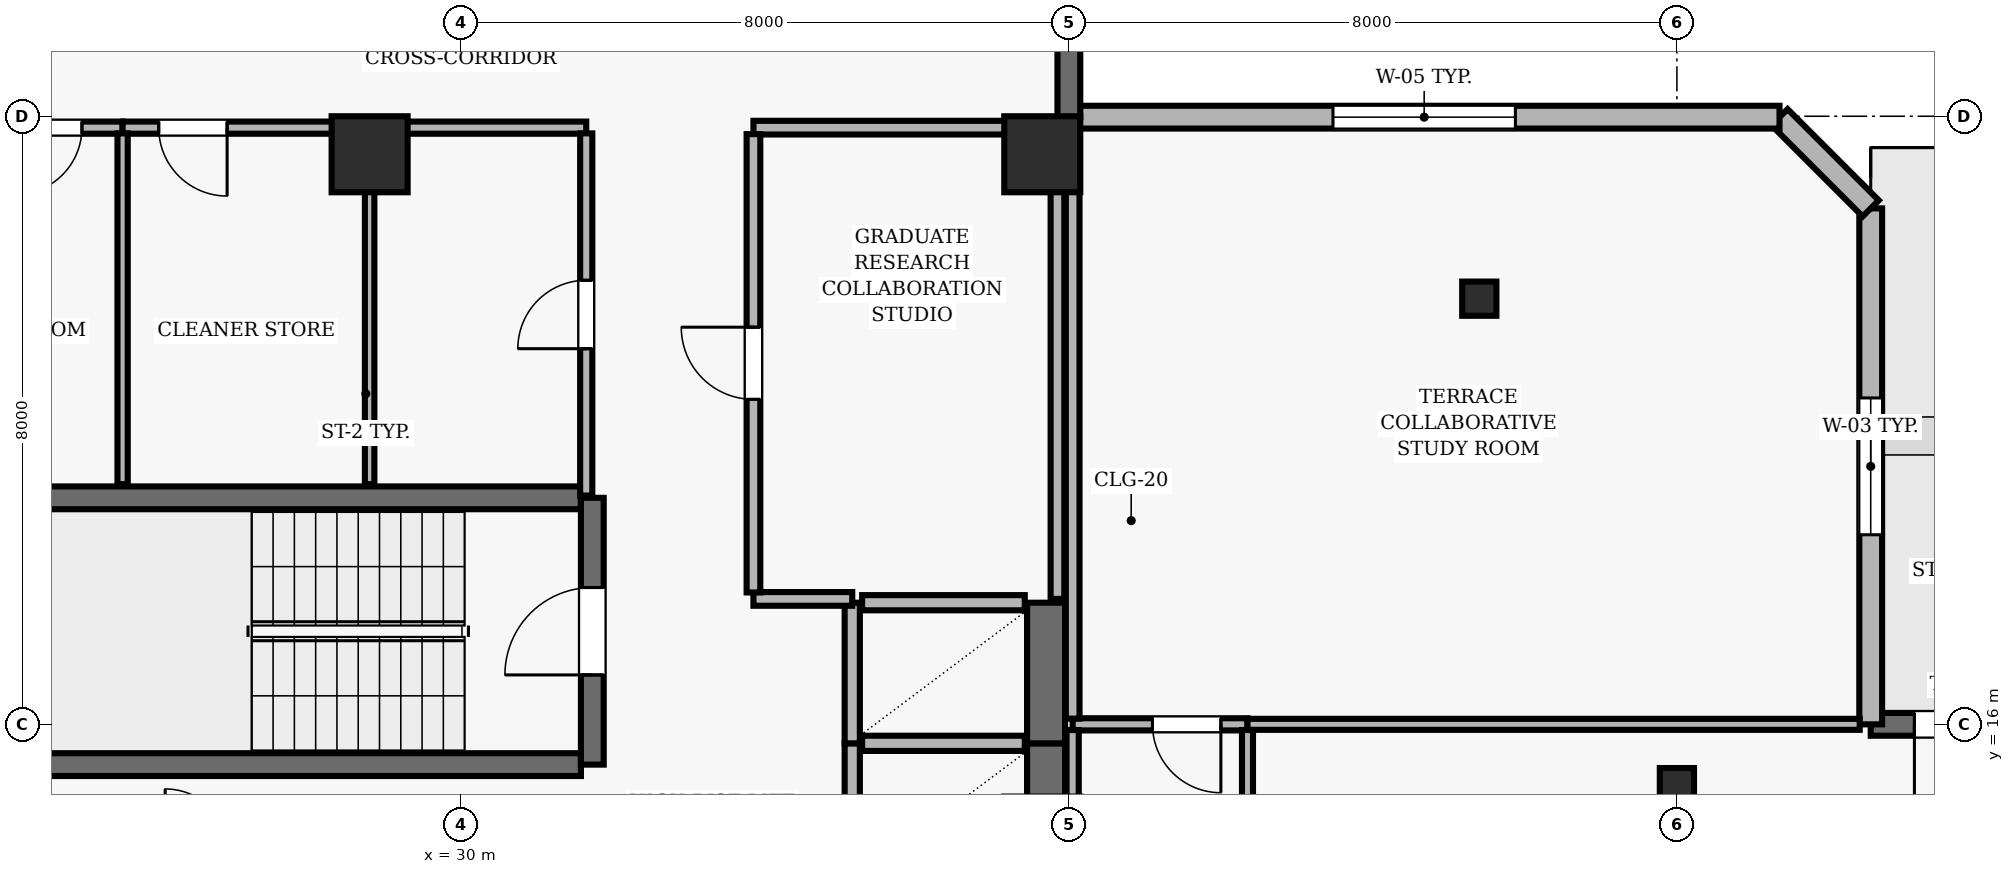
"""IFC4 building model, lengths in metres.
Left out: names, types, materials, properties, quantities, classifications, styles, units other than length and angle.
Written with IfcOpenShell. Run it as: python <this file> out.ifc"""

import sys

from ifc_helpers import new_model, si_unit, direction, frame, frame_2d, origin, origin_2d, place, context, subcontext, project, spatial, rectangle, hollow_rectangle, extrude, element, fill, save


model = new_model("IFC4")
c1 = context("Model", 3, precision=1e-05, world=origin(), true_north=direction((0.0, 1.0)))
c2 = subcontext(c1, "Body", "Model", "MODEL_VIEW")
j1 = project(units=[si_unit("LENGTHUNIT", "METRE"), si_unit("PLANEANGLEUNIT", "RADIAN")], contexts=[c1])
p1 = place(None, origin())
s1 = spatial("IfcSite", under=j1, at=p1, CompositionType="ELEMENT")
p2 = place(p1, origin())
s2 = spatial("IfcBuilding", under=s1, at=p2, CompositionType="ELEMENT")
p3 = place(p2, frame((0.0, 0.0, 187.5)))
s3 = spatial("IfcBuildingStorey", under=s2, at=p3, CompositionType="ELEMENT", Elevation=187.5)
for number, where, z_axis, x_axis in (
    (1, (28.8, 23.5, 0.0), (0.0, 0.0, 1.0), (1.0, 0.0, 0.0)),
    (2, (37.65, 23.5, 0.0), (0.0, 0.0, 1.0), (1.0, 0.0, 0.0)),
):
    element("IfcColumn", number, at=place(p3, frame(where, z_axis=z_axis, x_axis=x_axis)), inside=s3, PredefinedType="COLUMN", context=c2, shape_type="SweptSolid", body=[
        extrude(rectangle(XDim=1.0, YDim=1.0, at=origin_2d()), origin(), (0.0, 0.0, 1.0), 3.9),
    ])
for number, where, z_axis, x_axis in (
    (3, (46.0, 15.2, 0.0), (0.0, 0.0, 1.0), (1.0, 0.0, 0.0)),
    (4, (43.4, 21.6, 0.0), (0.0, 0.0, 1.0), (1.0, 0.0, 0.0)),
):
    element("IfcColumn", number, at=place(p3, frame(where, z_axis=z_axis, x_axis=x_axis)), inside=s3, PredefinedType="COLUMN", context=c2, shape_type="SweptSolid", body=[
        extrude(hollow_rectangle(XDim=0.45, YDim=0.45, WallThickness=0.02, at=origin_2d()), origin(), (0.0, 0.0, 1.0), 3.9),
    ])
p4 = place(p3, frame((62.7, 16.0, 0.0), z_axis=(0.0, 0.0, 1.0), x_axis=(-1.0, 0.0, 0.0)))
e5 = element("IfcWall", 5, at=p4, inside=s3, PredefinedType="SOLIDWALL", context=c2, shape_type="SweptSolid", body=[
    extrude(rectangle(XDim=14.15, YDim=0.3, at=frame_2d((7.075, 0.0))), origin(), (0.0, 0.0, 1.0), 3.69),
])
p5 = place(p4, frame((6.85, 0.0, 0.0)))
e6 = element("IfcOpeningElement", 6, at=p5, cuts=e5, PredefinedType="OPENING", context=c2, shape_type="SweptSolid", body=[
    extrude(rectangle(XDim=1.0, YDim=2.2, at=frame_2d((0.5, 1.1))), frame((0.0, 0.16, 0.0), z_axis=(0.0, -1.0, 0.0), x_axis=(1.0, 0.0, 0.0)), (0.0, 0.0, 1.0), 0.32),
])
p6 = place(p4, frame((12.225, 0.0, 0.0)))
e7 = element("IfcOpeningElement", 7, at=p6, cuts=e5, PredefinedType="OPENING", context=c2, shape_type="SweptSolid", body=[
    extrude(rectangle(XDim=1.35, YDim=2.2, at=frame_2d((0.675, 1.1))), frame((0.0, 0.16, 0.0), z_axis=(0.0, -1.0, 0.0), x_axis=(1.0, 0.0, 0.0)), (0.0, 0.0, 1.0), 0.32),
])
p7 = place(p4, frame((2.788, 0.0, 0.9)))
e8 = element("IfcOpeningElement", 8, at=p7, cuts=e5, PredefinedType="OPENING", context=c2, shape_type="SweptSolid", body=[
    extrude(rectangle(XDim=1.5, YDim=1.6, at=frame_2d((0.75, 0.8))), frame((0.0, 0.16, 0.0), z_axis=(0.0, -1.0, 0.0), x_axis=(1.0, 0.0, 0.0)), (0.0, 0.0, 1.0), 0.32),
])
p8 = place(p3, frame((48.55, 16.0, 0.0), z_axis=(0.0, 0.0, 1.0), x_axis=(0.0, 1.0, 0.0)))
e9 = element("IfcWall", 9, at=p8, inside=s3, PredefinedType="SOLIDWALL", context=c2, shape_type="SweptSolid", body=[
    extrude(rectangle(XDim=6.788, YDim=0.3, at=frame_2d((3.394, 0.0))), origin(), (0.0, 0.0, 1.0), 3.69),
])
p9 = place(p8, frame((2.494, 0.0, 0.9)))
e10 = element("IfcOpeningElement", 10, at=p9, cuts=e9, PredefinedType="OPENING", context=c2, shape_type="SweptSolid", body=[
    extrude(rectangle(XDim=1.8, YDim=1.6, at=frame_2d((0.9, 0.8))), frame((0.0, 0.16, 0.0), z_axis=(0.0, -1.0, 0.0), x_axis=(1.0, 0.0, 0.0)), (0.0, 0.0, 1.0), 0.32),
])
p10 = place(p3, frame((48.55, 22.788, 0.0), z_axis=(0.0, 0.0, 1.0), x_axis=(-0.707106781187, 0.707106781187, 0.0)))
e11 = element("IfcWall", 11, at=p10, inside=s3, PredefinedType="SOLIDWALL", context=c2, shape_type="SweptSolid", body=[
    extrude(rectangle(XDim=1.697, YDim=0.3, at=frame_2d((0.849, 0.0))), origin(), (0.0, 0.0, 1.0), 3.69),
])
p11 = place(p3, frame((47.35, 23.988, 0.0), z_axis=(0.0, 0.0, 1.0), x_axis=(-1.0, 0.0, 0.0)))
e12 = element("IfcWall", 12, at=p11, inside=s3, PredefinedType="SOLIDWALL", context=c2, shape_type="SweptSolid", body=[
    extrude(rectangle(XDim=9.35, YDim=0.3, at=frame_2d((4.675, 0.0))), origin(), (0.0, 0.0, 1.0), 3.69),
])
p12 = place(p11, frame((3.475, 0.0, 0.9)))
e13 = element("IfcOpeningElement", 13, at=p12, cuts=e12, PredefinedType="OPENING", context=c2, shape_type="SweptSolid", body=[
    extrude(rectangle(XDim=2.4, YDim=1.6, at=frame_2d((1.2, 0.8))), frame((0.0, 0.16, 0.0), z_axis=(0.0, -1.0, 0.0), x_axis=(1.0, 0.0, 0.0)), (0.0, 0.0, 1.0), 0.32),
])
p13 = place(p3, frame((38.0, 23.988, 0.0), z_axis=(0.0, 0.0, 1.0), x_axis=(0.0, 1.0, 0.0)))
e14 = element("IfcWall", 14, at=p13, inside=s3, PredefinedType="SOLIDWALL", context=c2, shape_type="SweptSolid", body=[
    extrude(rectangle(XDim=16.712, YDim=0.3, at=frame_2d((8.356, 0.0))), origin(), (0.0, 0.0, 1.0), 3.69),
])
p14 = place(p13, frame((8.282, 0.0, 0.0)))
e15 = element("IfcOpeningElement", 15, at=p14, cuts=e14, PredefinedType="OPENING", context=c2, shape_type="SweptSolid", body=[
    extrude(rectangle(XDim=1.0, YDim=2.2, at=frame_2d((0.5, 1.1))), frame((0.0, 0.16, 0.0), z_axis=(0.0, -1.0, 0.0), x_axis=(1.0, 0.0, 0.0)), (0.0, 0.0, 1.0), 0.32),
])
p15 = place(p13, frame((2.935, 0.0, 0.9)))
e16 = element("IfcOpeningElement", 16, at=p15, cuts=e14, PredefinedType="OPENING", context=c2, shape_type="SweptSolid", body=[
    extrude(rectangle(XDim=1.5, YDim=1.8, at=frame_2d((0.75, 0.9))), frame((0.0, 0.16, 0.0), z_axis=(0.0, -1.0, 0.0), x_axis=(1.0, 0.0, 0.0)), (0.0, 0.0, 1.0), 0.32),
])
p16 = place(p13, frame((12.727, 0.0, 0.9)))
e17 = element("IfcOpeningElement", 17, at=p16, cuts=e14, PredefinedType="OPENING", context=c2, shape_type="SweptSolid", body=[
    extrude(rectangle(XDim=1.5, YDim=1.8, at=frame_2d((0.75, 0.9))), frame((0.0, 0.16, 0.0), z_axis=(0.0, -1.0, 0.0), x_axis=(1.0, 0.0, 0.0)), (0.0, 0.0, 1.0), 0.32),
])
for number, where, z_axis, x_axis in (
    (18, (31.58, 18.98, 0.0), (0.0, 0.0, 1.0), (-1.0, 0.0, 0.0)),
    (19, (23.22, 15.47, 0.0), (0.0, 0.0, 1.0), (1.0, 0.0, 0.0)),
):
    element("IfcWall", number, at=place(p3, frame(where, z_axis=z_axis, x_axis=x_axis)), inside=s3, PredefinedType="SHEAR", context=c2, shape_type="SweptSolid", body=[
        extrude(rectangle(XDim=8.36, YDim=0.3, at=frame_2d((4.18, 0.0))), origin(), (0.0, 0.0, 1.0), 3.69),
    ])
p17 = place(p3, frame((31.73, 15.47, 0.0), z_axis=(0.0, 0.0, 1.0), x_axis=(0.0, 1.0, 0.0)))
e20 = element("IfcWall", 20, at=p17, inside=s3, PredefinedType="SHEAR", context=c2, shape_type="SweptSolid", body=[
    extrude(rectangle(XDim=3.51, YDim=0.3, at=frame_2d((1.755, 0.0))), origin(), (0.0, 0.0, 1.0), 3.69),
])
p18 = place(p17, frame((1.18, 0.0, 0.0)))
e21 = element("IfcOpeningElement", 21, at=p18, cuts=e20, PredefinedType="OPENING", context=c2, shape_type="SweptSolid", body=[
    extrude(rectangle(XDim=1.15, YDim=2.15, at=frame_2d((0.575, 1.075))), frame((0.0, 0.16, 0.0), z_axis=(0.0, -1.0, 0.0), x_axis=(1.0, 0.0, 0.0)), (0.0, 0.0, 1.0), 0.32),
])
p19 = place(p3, frame((35.15, 15.75, 0.0), z_axis=(0.0, 0.0, 1.0), x_axis=(0.0, -1.0, 0.0)))
e22 = element("IfcWall", 22, at=p19, inside=s3, PredefinedType="SOLIDWALL", context=c2, shape_type="SweptSolid", body=[
    extrude(rectangle(XDim=1.85, YDim=0.2, at=frame_2d((0.925, 0.0))), origin(), (0.0, 0.0, 1.0), 3.69),
])
p20 = place(p3, frame((37.7, 13.9, 0.0), z_axis=(0.0, 0.0, 1.0), x_axis=(0.0, 1.0, 0.0)))
e23 = element("IfcWall", 23, at=p20, inside=s3, PredefinedType="SHEAR", context=c2, shape_type="SweptSolid", body=[
    extrude(rectangle(XDim=1.85, YDim=0.5, at=frame_2d((0.925, 0.0))), origin(), (0.0, 0.0, 1.0), 3.69),
])
p21 = place(p3, frame((37.42, 15.75, 0.0), z_axis=(0.0, 0.0, 1.0), x_axis=(-1.0, 0.0, 0.0)))
e24 = element("IfcWall", 24, at=p21, inside=s3, PredefinedType="SOLIDWALL", context=c2, shape_type="SweptSolid", body=[
    extrude(rectangle(XDim=2.14, YDim=0.2, at=frame_2d((1.07, 0.0))), origin(), (0.0, 0.0, 1.0), 3.69),
])
p22 = place(p3, frame((35.15, 17.6, 0.0), z_axis=(0.0, 0.0, 1.0), x_axis=(0.0, -1.0, 0.0)))
e25 = element("IfcWall", 25, at=p22, inside=s3, PredefinedType="SOLIDWALL", context=c2, shape_type="SweptSolid", body=[
    extrude(rectangle(XDim=1.85, YDim=0.2, at=frame_2d((0.925, 0.0))), origin(), (0.0, 0.0, 1.0), 3.69),
])
p23 = place(p3, frame((37.7, 15.75, 0.0), z_axis=(0.0, 0.0, 1.0), x_axis=(0.0, 1.0, 0.0)))
e26 = element("IfcWall", 26, at=p23, inside=s3, PredefinedType="SHEAR", context=c2, shape_type="SweptSolid", body=[
    extrude(rectangle(XDim=1.85, YDim=0.5, at=frame_2d((0.925, 0.0))), origin(), (0.0, 0.0, 1.0), 3.69),
])
p24 = place(p3, frame((37.42, 17.6, 0.0), z_axis=(0.0, 0.0, 1.0), x_axis=(-1.0, 0.0, 0.0)))
e27 = element("IfcWall", 27, at=p24, inside=s3, PredefinedType="SOLIDWALL", context=c2, shape_type="SweptSolid", body=[
    extrude(rectangle(XDim=2.14, YDim=0.2, at=frame_2d((1.07, 0.0))), origin(), (0.0, 0.0, 1.0), 3.69),
])
p25 = place(p3, frame((25.55, 23.85, 0.0), z_axis=(0.0, 0.0, 1.0), x_axis=(-1.0, 0.0, 0.0)))
e28 = element("IfcWall", 28, at=p25, inside=s3, PredefinedType="PARTITIONING", context=c2, shape_type="SweptSolid", body=[
    extrude(rectangle(XDim=3.35, YDim=0.16, at=frame_2d((1.675, 0.0))), origin(), (0.0, 0.0, 1.0), 3.146),
])
p26 = place(p25, frame((0.535, 0.0, 0.0)))
e29 = element("IfcOpeningElement", 29, at=p26, cuts=e28, PredefinedType="OPENING", context=c2, shape_type="SweptSolid", body=[
    extrude(rectangle(XDim=0.88, YDim=2.1, at=frame_2d((0.44, 1.05))), frame((0.0, 0.09, 0.0), z_axis=(0.0, -1.0, 0.0), x_axis=(1.0, 0.0, 0.0)), (0.0, 0.0, 1.0), 0.18),
])
p27 = place(p3, frame((28.8, 23.85, 0.0), z_axis=(0.0, 0.0, 1.0), x_axis=(-1.0, 0.0, 0.0)))
e30 = element("IfcWall", 30, at=p27, inside=s3, PredefinedType="PARTITIONING", context=c2, shape_type="SweptSolid", body=[
    extrude(rectangle(XDim=3.25, YDim=0.16, at=frame_2d((1.625, 0.0))), origin(), (0.0, 0.0, 1.0), 3.146),
])
p28 = place(p27, frame((1.875, 0.0, 0.0)))
e31 = element("IfcOpeningElement", 31, at=p28, cuts=e30, PredefinedType="OPENING", context=c2, shape_type="SweptSolid", body=[
    extrude(rectangle(XDim=0.9, YDim=2.1, at=frame_2d((0.45, 1.05))), frame((0.0, 0.09, 0.0), z_axis=(0.0, -1.0, 0.0), x_axis=(1.0, 0.0, 0.0)), (0.0, 0.0, 1.0), 0.18),
])
p29 = place(p3, frame((31.65, 23.85, 0.0), z_axis=(0.0, 0.0, 1.0), x_axis=(-1.0, 0.0, 0.0)))
e32 = element("IfcWall", 32, at=p29, inside=s3, PredefinedType="PARTITIONING", context=c2, shape_type="SweptSolid", body=[
    extrude(rectangle(XDim=2.85, YDim=0.16, at=frame_2d((1.425, 0.0))), origin(), (0.0, 0.0, 1.0), 3.146),
])
p30 = place(p3, frame((33.85, 17.65, 0.0), z_axis=(0.0, 0.0, 1.0), x_axis=(1.0, 0.0, 0.0)))
e33 = element("IfcWall", 33, at=p30, inside=s3, PredefinedType="PARTITIONING", context=c2, shape_type="SweptSolid", body=[
    extrude(rectangle(XDim=1.3, YDim=0.18, at=frame_2d((0.65, 0.0))), origin(), (0.0, 0.0, 1.0), 3.69),
])
p31 = place(p3, frame((37.85, 23.85, 0.0), z_axis=(0.0, 0.0, 1.0), x_axis=(-1.0, 0.0, 0.0)))
e34 = element("IfcWall", 34, at=p31, inside=s3, PredefinedType="PARTITIONING", context=c2, shape_type="SweptSolid", body=[
    extrude(rectangle(XDim=4.0, YDim=0.18, at=frame_2d((2.0, 0.0))), origin(), (0.0, 0.0, 1.0), 3.146),
])
p32 = place(p3, frame((40.35, 16.0, 0.0), z_axis=(0.0, 0.0, 1.0), x_axis=(-1.0, 0.0, 0.0)))
e35 = element("IfcWall", 35, at=p32, inside=s3, PredefinedType="PARTITIONING", context=c2, shape_type="SweptSolid", body=[
    extrude(rectangle(XDim=2.3, YDim=0.16, at=frame_2d((1.15, 0.0))), origin(), (0.0, 0.0, 1.0), 3.69),
])
p33 = place(p32, frame((0.35, 0.0, 0.0)))
e36 = element("IfcOpeningElement", 36, at=p33, cuts=e35, PredefinedType="OPENING", context=c2, shape_type="SweptSolid", body=[
    extrude(rectangle(XDim=0.9, YDim=2.1, at=frame_2d((0.45, 1.05))), frame((0.0, 0.09, 0.0), z_axis=(0.0, -1.0, 0.0), x_axis=(1.0, 0.0, 0.0)), (0.0, 0.0, 1.0), 0.18),
])
p34 = place(p3, frame((40.35, 16.0, 0.0), z_axis=(0.0, 0.0, 1.0), x_axis=(1.0, 0.0, 0.0)))
e37 = element("IfcWall", 37, at=p34, inside=s3, PredefinedType="PARTITIONING", context=c2, shape_type="SweptSolid", body=[
    extrude(rectangle(XDim=8.055, YDim=0.145, at=frame_2d((4.027, 0.0))), origin(), (0.0, 0.0, 1.0), 3.39),
])
p35 = place(p3, frame((25.55, 19.16, 0.0), z_axis=(0.0, 0.0, 1.0), x_axis=(0.0, 1.0, 0.0)))
e38 = element("IfcWall", 38, at=p35, inside=s3, PredefinedType="PARTITIONING", context=c2, shape_type="SweptSolid", body=[
    extrude(rectangle(XDim=4.615, YDim=0.135, at=frame_2d((2.308, 0.0))), origin(), (0.0, 0.0, 1.0), 3.69),
])
p36 = place(p3, frame((28.8, 23.775, 0.0), z_axis=(0.0, 0.0, 1.0), x_axis=(0.0, -1.0, 0.0)))
e39 = element("IfcWall", 39, at=p36, inside=s3, PredefinedType="PARTITIONING", context=c2, shape_type="SweptSolid", body=[
    extrude(rectangle(XDim=4.615, YDim=0.125, at=frame_2d((2.308, 0.0))), origin(), (0.0, 0.0, 1.0), 3.69),
])
p37 = place(p3, frame((31.65, 19.01, 0.0), z_axis=(0.0, 0.0, 1.0), x_axis=(0.0, 1.0, 0.0)))
e40 = element("IfcWall", 40, at=p37, inside=s3, PredefinedType="PARTITIONING", context=c2, shape_type="SweptSolid", body=[
    extrude(rectangle(XDim=4.765, YDim=0.16, at=frame_2d((2.382, 0.0))), origin(), (0.0, 0.0, 1.0), 3.69),
])
p38 = place(p37, frame((1.932, 0.0, 0.0)))
e41 = element("IfcOpeningElement", 41, at=p38, cuts=e40, PredefinedType="OPENING", context=c2, shape_type="SweptSolid", body=[
    extrude(rectangle(XDim=0.9, YDim=2.1, at=frame_2d((0.45, 1.05))), frame((0.0, 0.09, 0.0), z_axis=(0.0, -1.0, 0.0), x_axis=(1.0, 0.0, 0.0)), (0.0, 0.0, 1.0), 0.18),
])
p39 = place(p3, frame((33.85, 17.735, 0.0), z_axis=(0.0, 0.0, 1.0), x_axis=(0.0, 1.0, 0.0)))
e42 = element("IfcWall", 42, at=p39, inside=s3, PredefinedType="PARTITIONING", context=c2, shape_type="SweptSolid", body=[
    extrude(rectangle(XDim=6.03, YDim=0.18, at=frame_2d((3.015, 0.0))), origin(), (0.0, 0.0, 1.0), 3.69),
])
p40 = place(p39, frame((2.54, 0.0, 0.0)))
e43 = element("IfcOpeningElement", 43, at=p40, cuts=e42, PredefinedType="OPENING", context=c2, shape_type="SweptSolid", body=[
    extrude(rectangle(XDim=0.95, YDim=2.1, at=frame_2d((0.475, 1.05))), frame((0.0, 0.1, 0.0), z_axis=(0.0, -1.0, 0.0), x_axis=(1.0, 0.0, 0.0)), (0.0, 0.0, 1.0), 0.2),
])
p41 = place(p3, frame((37.85, 17.65, 0.0), z_axis=(0.0, 0.0, 1.0), x_axis=(0.0, 1.0, 0.0)))
e44 = element("IfcWall", 44, at=p41, inside=s3, PredefinedType="PARTITIONING", context=c2, shape_type="SweptSolid", body=[
    extrude(rectangle(XDim=6.115, YDim=0.18, at=frame_2d((3.058, 0.0))), origin(), (0.0, 0.0, 1.0), 3.146),
])
p42 = place(p3, frame((38.05, 15.925, 0.0), z_axis=(0.0, 0.0, 1.0), x_axis=(0.0, -1.0, 0.0)))
e45 = element("IfcWall", 45, at=p42, inside=s3, PredefinedType="PARTITIONING", context=c2, shape_type="SweptSolid", body=[
    extrude(rectangle(XDim=6.375, YDim=0.16, at=frame_2d((3.188, 0.0))), origin(), (0.0, 0.0, 1.0), 3.146),
])
p43 = place(p3, frame((38.05, 23.843, 0.0), z_axis=(0.0, 0.0, 1.0), x_axis=(0.0, -1.0, 0.0)))
e46 = element("IfcWall", 46, at=p43, inside=s3, PredefinedType="PARTITIONING", context=c2, shape_type="SweptSolid", body=[
    extrude(rectangle(XDim=7.768, YDim=0.18, at=frame_2d((3.884, 0.0))), origin(), (0.0, 0.0, 1.0), 3.146),
])
p44 = place(p3, frame((40.35, 7.617, 0.0), z_axis=(0.0, 0.0, 1.0), x_axis=(0.0, 1.0, 0.0)))
e47 = element("IfcWall", 47, at=p44, inside=s3, PredefinedType="PARTITIONING", context=c2, shape_type="SweptSolid", body=[
    extrude(rectangle(XDim=8.308, YDim=0.145, at=frame_2d((4.154, 0.0))), origin(), (0.0, 0.0, 1.0), 3.372),
])
p45 = place(p6, origin())
e48 = element("IfcDoor", 48, at=p45, inside=s3, OperationType="SINGLE_SWING_RIGHT", PredefinedType="DOOR", context=c2, shape_type="SweptSolid", body=[
    extrude(rectangle(XDim=1.35, YDim=2.2, at=frame_2d((0.675, 1.1))), frame((0.0, 0.025, 0.0), z_axis=(0.0, -1.0, 0.0), x_axis=(1.0, 0.0, 0.0)), (0.0, 0.0, 1.0), 0.05),
])
fill(e7, e48)
p46 = place(p9, origin())
e49 = element("IfcWindow", 49, at=p46, inside=s3, PartitioningType="SINGLE_PANEL", PredefinedType="WINDOW", context=c2, shape_type="SweptSolid", body=[
    extrude(rectangle(XDim=1.8, YDim=1.6, at=frame_2d((0.9, 0.8))), frame((0.0, 0.03, 0.0), z_axis=(0.0, -1.0, 0.0), x_axis=(1.0, 0.0, 0.0)), (0.0, 0.0, 1.0), 0.06),
])
fill(e10, e49)
p47 = place(p12, origin())
e50 = element("IfcWindow", 50, at=p47, inside=s3, PartitioningType="SINGLE_PANEL", PredefinedType="WINDOW", context=c2, shape_type="SweptSolid", body=[
    extrude(rectangle(XDim=2.4, YDim=1.6, at=frame_2d((1.2, 0.8))), frame((0.0, 0.03, 0.0), z_axis=(0.0, -1.0, 0.0), x_axis=(1.0, 0.0, 0.0)), (0.0, 0.0, 1.0), 0.06),
])
fill(e13, e50)
p48 = place(p18, origin())
e51 = element("IfcDoor", 51, at=p48, inside=s3, OperationType="SINGLE_SWING_LEFT", PredefinedType="DOOR", context=c2, shape_type="SweptSolid", body=[
    extrude(rectangle(XDim=1.15, YDim=2.15, at=frame_2d((0.575, 1.075))), frame((0.0, 0.025, 0.0), z_axis=(0.0, -1.0, 0.0), x_axis=(1.0, 0.0, 0.0)), (0.0, 0.0, 1.0), 0.05),
])
fill(e21, e51)
p49 = place(p40, origin())
e52 = element("IfcDoor", 52, at=p49, inside=s3, OperationType="SINGLE_SWING_RIGHT", PredefinedType="DOOR", context=c2, shape_type="SweptSolid", body=[
    extrude(rectangle(XDim=0.95, YDim=2.1, at=frame_2d((0.475, 1.05))), frame((0.0, 0.025, 0.0), z_axis=(0.0, -1.0, 0.0), x_axis=(1.0, 0.0, 0.0)), (0.0, 0.0, 1.0), 0.05),
])
fill(e43, e52)
p50 = place(p38, origin())
e53 = element("IfcDoor", 53, at=p50, inside=s3, OperationType="SINGLE_SWING_LEFT", PredefinedType="DOOR", context=c2, shape_type="SweptSolid", body=[
    extrude(rectangle(XDim=0.9, YDim=2.1, at=frame_2d((0.45, 1.05))), frame((0.0, 0.025, 0.0), z_axis=(0.0, -1.0, 0.0), x_axis=(1.0, 0.0, 0.0)), (0.0, 0.0, 1.0), 0.05),
])
fill(e41, e53)
p51 = place(p26, origin())
e54 = element("IfcDoor", 54, at=p51, inside=s3, OperationType="SINGLE_SWING_RIGHT", PredefinedType="DOOR", context=c2, shape_type="SweptSolid", body=[
    extrude(rectangle(XDim=0.88, YDim=2.1, at=frame_2d((0.44, 1.05))), frame((0.0, 0.025, 0.0), z_axis=(0.0, -1.0, 0.0), x_axis=(1.0, 0.0, 0.0)), (0.0, 0.0, 1.0), 0.05),
])
fill(e29, e54)
p52 = place(p28, origin())
e55 = element("IfcDoor", 55, at=p52, inside=s3, OperationType="SINGLE_SWING_LEFT", PredefinedType="DOOR", context=c2, shape_type="SweptSolid", body=[
    extrude(rectangle(XDim=0.9, YDim=2.1, at=frame_2d((0.45, 1.05))), frame((0.0, 0.025, 0.0), z_axis=(0.0, -1.0, 0.0), x_axis=(1.0, 0.0, 0.0)), (0.0, 0.0, 1.0), 0.05),
])
fill(e31, e55)
p53 = place(p33, origin())
e56 = element("IfcDoor", 56, at=p53, inside=s3, OperationType="SINGLE_SWING_LEFT", PredefinedType="DOOR", context=c2, shape_type="SweptSolid", body=[
    extrude(rectangle(XDim=0.9, YDim=2.1, at=frame_2d((0.45, 1.05))), frame((0.0, 0.025, 0.0), z_axis=(0.0, -1.0, 0.0), x_axis=(1.0, 0.0, 0.0)), (0.0, 0.0, 1.0), 0.05),
])
fill(e36, e56)
save(model, sys.argv[1])
